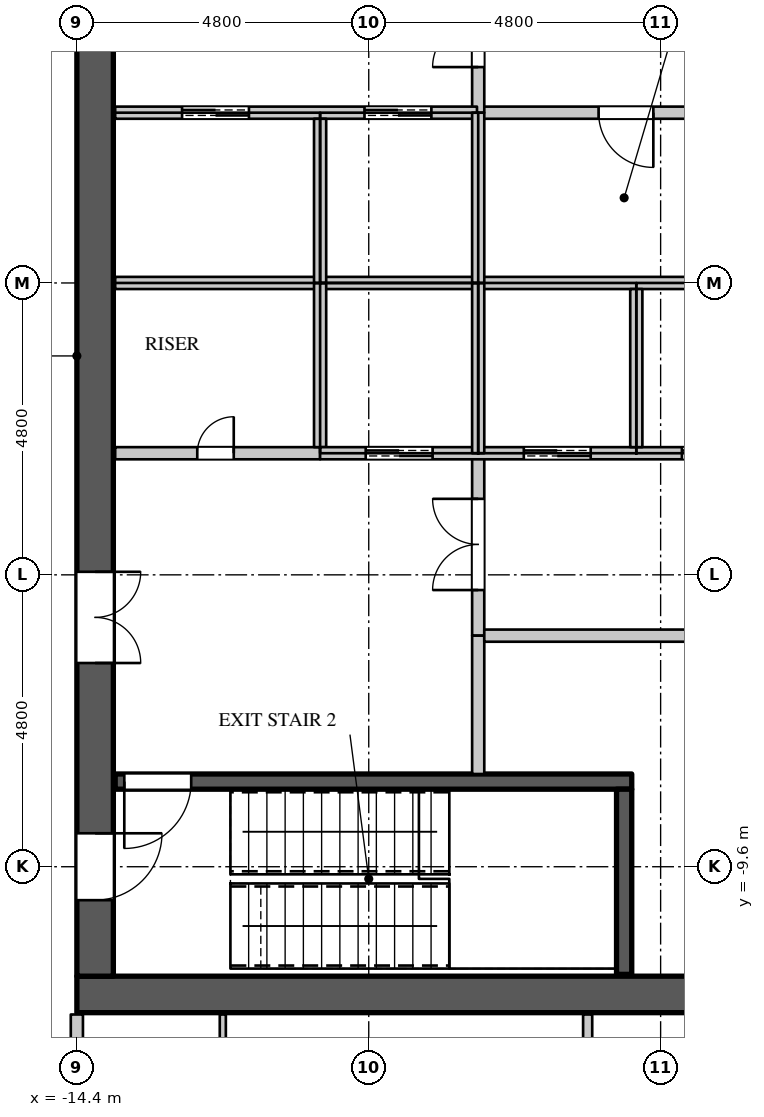
"""IFC4 building model, lengths in metres.
Left out: names, types, materials, properties, quantities, classifications, styles, units other than length and angle.
Written with IfcOpenShell. Run it as: python <this file> out.ifc"""

import sys

from ifc_helpers import new_model, si_unit, direction, frame, frame_2d, origin, place, context, subcontext, project, spatial, rectangle, extrude, element, fill, save


model = new_model("IFC4")
c1 = context("Model", 3, precision=1e-05, world=origin(), true_north=direction((0.0, 1.0)))
c2 = subcontext(c1, "Body", "Model", "MODEL_VIEW")
j1 = project(units=[si_unit("LENGTHUNIT", "METRE"), si_unit("PLANEANGLEUNIT", "RADIAN")], contexts=[c1])
p1 = place(None, origin())
s1 = spatial("IfcSite", under=j1, at=p1, CompositionType="ELEMENT")
p2 = place(p1, origin())
s2 = spatial("IfcBuilding", under=s1, at=p2, CompositionType="ELEMENT")
p3 = place(p2, frame((0.0, 0.0, 272.7)))
s3 = spatial("IfcBuildingStorey", under=s2, at=p3, CompositionType="ELEMENT", Elevation=272.7)
p4 = place(p3, frame((-14.4, -11.7, 0.0), z_axis=(0.0, 0.0, 1.0), x_axis=(1.0, 0.0, 0.0)))
e1 = element("IfcWall", 1, at=p4, inside=s3, PredefinedType="SHEAR", context=c2, shape_type="SweptSolid", body=[
    extrude(rectangle(XDim=28.8, YDim=0.6, at=frame_2d((14.4, 0.0))), origin(), (0.0, 0.0, 1.0), 4.2),
])
p5 = place(p3, frame((-14.1, -11.4, 0.0), z_axis=(0.0, 0.0, 1.0), x_axis=(0.0, 1.0, 0.0)))
e2 = element("IfcWall", 2, at=p5, inside=s3, PredefinedType="SHEAR", context=c2, shape_type="SweptSolid", body=[
    extrude(rectangle(XDim=22.8, YDim=0.6, at=frame_2d((11.4, 0.0))), origin(), (0.0, 0.0, 1.0), 4.2),
])
p6 = place(p5, frame((20.45, 0.0, 0.0)))
e3 = element("IfcOpeningElement", 3, at=p6, cuts=e2, PredefinedType="OPENING", context=c2, shape_type="SweptSolid", body=[
    extrude(rectangle(XDim=1.1, YDim=2.2, at=frame_2d((0.55, 1.1))), frame((0.0, 0.31, 0.0), z_axis=(0.0, -1.0, 0.0), x_axis=(1.0, 0.0, 0.0)), (0.0, 0.0, 1.0), 0.62),
])
p7 = place(p5, frame((1.25, 0.0, 0.0)))
e4 = element("IfcOpeningElement", 4, at=p7, cuts=e2, PredefinedType="OPENING", context=c2, shape_type="SweptSolid", body=[
    extrude(rectangle(XDim=1.1, YDim=2.2, at=frame_2d((0.55, 1.1))), frame((0.0, 0.31, 0.0), z_axis=(0.0, -1.0, 0.0), x_axis=(1.0, 0.0, 0.0)), (0.0, 0.0, 1.0), 0.62),
])
p8 = place(p5, frame((16.15, 0.0, 0.0)))
e5 = element("IfcOpeningElement", 5, at=p8, cuts=e2, PredefinedType="OPENING", context=c2, shape_type="SweptSolid", body=[
    extrude(rectangle(XDim=1.5, YDim=2.4, at=frame_2d((0.75, 1.2))), frame((0.0, 0.31, 0.0), z_axis=(0.0, -1.0, 0.0), x_axis=(1.0, 0.0, 0.0)), (0.0, 0.0, 1.0), 0.62),
])
p9 = place(p5, frame((5.15, 0.0, 0.0)))
e6 = element("IfcOpeningElement", 6, at=p9, cuts=e2, PredefinedType="OPENING", context=c2, shape_type="SweptSolid", body=[
    extrude(rectangle(XDim=1.5, YDim=2.4, at=frame_2d((0.75, 1.2))), frame((0.0, 0.31, 0.0), z_axis=(0.0, -1.0, 0.0), x_axis=(1.0, 0.0, 0.0)), (0.0, 0.0, 1.0), 0.62),
])
p10 = place(p3, frame((-14.4, -14.3, 0.0), z_axis=(0.0, 0.0, 1.0), x_axis=(0.0, 1.0, 0.0)))
e7 = element("IfcWall", 7, at=p10, inside=s3, PredefinedType="PARTITIONING", context=c2, shape_type="SweptSolid", body=[
    extrude(rectangle(XDim=2.27, YDim=0.2, at=frame_2d((1.135, 0.0))), origin(), (0.0, 0.0, 1.0), 3.95),
])
p11 = place(p3, frame((-7.82, 2.8, 0.0), z_axis=(0.0, 0.0, 1.0), x_axis=(1.0, 0.0, 0.0)))
e8 = element("IfcWall", 8, at=p11, inside=s3, PredefinedType="PARTITIONING", context=c2, shape_type="SweptSolid", body=[
    extrude(rectangle(XDim=18.24, YDim=0.2, at=frame_2d((9.12, 0.0))), origin(), (0.0, 0.0, 1.0), 3.95),
])
p12 = place(p11, frame((2.0, 0.0, 0.0)))
e9 = element("IfcOpeningElement", 9, at=p12, cuts=e8, PredefinedType="OPENING", context=c2, shape_type="SweptSolid", body=[
    extrude(rectangle(XDim=0.9, YDim=2.2, at=frame_2d((0.45, 1.1))), frame((0.0, 0.11, 0.0), z_axis=(0.0, -1.0, 0.0), x_axis=(1.0, 0.0, 0.0)), (0.0, 0.0, 1.0), 0.22),
])
p13 = place(p11, frame((6.25, 0.0, 0.0)))
e10 = element("IfcOpeningElement", 10, at=p13, cuts=e8, PredefinedType="OPENING", context=c2, shape_type="SweptSolid", body=[
    extrude(rectangle(XDim=0.9, YDim=2.2, at=frame_2d((0.45, 1.1))), frame((0.0, 0.11, 0.0), z_axis=(0.0, -1.0, 0.0), x_axis=(1.0, 0.0, 0.0)), (0.0, 0.0, 1.0), 0.22),
])
p14 = place(p11, frame((9.65, 0.0, 0.0)))
e11 = element("IfcOpeningElement", 11, at=p14, cuts=e8, PredefinedType="OPENING", context=c2, shape_type="SweptSolid", body=[
    extrude(rectangle(XDim=0.9, YDim=2.2, at=frame_2d((0.45, 1.1))), frame((0.0, 0.11, 0.0), z_axis=(0.0, -1.0, 0.0), x_axis=(1.0, 0.0, 0.0)), (0.0, 0.0, 1.0), 0.22),
])
p15 = place(p11, frame((12.35, 0.0, 0.0)))
e12 = element("IfcOpeningElement", 12, at=p15, cuts=e8, PredefinedType="OPENING", context=c2, shape_type="SweptSolid", body=[
    extrude(rectangle(XDim=0.9, YDim=2.2, at=frame_2d((0.45, 1.1))), frame((0.0, 0.11, 0.0), z_axis=(0.0, -1.0, 0.0), x_axis=(1.0, 0.0, 0.0)), (0.0, 0.0, 1.0), 0.22),
])
p16 = place(p11, frame((15.6, 0.0, 0.0)))
e13 = element("IfcOpeningElement", 13, at=p16, cuts=e8, PredefinedType="OPENING", context=c2, shape_type="SweptSolid", body=[
    extrude(rectangle(XDim=0.9, YDim=2.2, at=frame_2d((0.45, 1.1))), frame((0.0, 0.11, 0.0), z_axis=(0.0, -1.0, 0.0), x_axis=(1.0, 0.0, 0.0)), (0.0, 0.0, 1.0), 0.22),
])
p17 = place(p3, frame((-7.8, -5.8, 0.0), z_axis=(0.0, 0.0, 1.0), x_axis=(0.0, 1.0, 0.0)))
e14 = element("IfcWall", 14, at=p17, inside=s3, PredefinedType="PARTITIONING", context=c2, shape_type="SweptSolid", body=[
    extrude(rectangle(XDim=3.0, YDim=0.2, at=frame_2d((1.5, 0.0))), origin(), (0.0, 0.0, 1.0), 3.95),
])
p18 = place(p17, frame((0.75, 0.0, 0.0)))
e15 = element("IfcOpeningElement", 15, at=p18, cuts=e14, PredefinedType="OPENING", context=c2, shape_type="SweptSolid", body=[
    extrude(rectangle(XDim=1.5, YDim=2.4, at=frame_2d((0.75, 1.2))), frame((0.0, 0.11, 0.0), z_axis=(0.0, -1.0, 0.0), x_axis=(1.0, 0.0, 0.0)), (0.0, 0.0, 1.0), 0.22),
])
p19 = place(p3, frame((-7.8, 2.8, 0.0), z_axis=(0.0, 0.0, 1.0), x_axis=(0.0, 1.0, 0.0)))
e16 = element("IfcWall", 16, at=p19, inside=s3, PredefinedType="PARTITIONING", context=c2, shape_type="SweptSolid", body=[
    extrude(rectangle(XDim=3.0, YDim=0.2, at=frame_2d((1.5, 0.0))), origin(), (0.0, 0.0, 1.0), 3.95),
])
p20 = place(p19, frame((0.75, 0.0, 0.0)))
e17 = element("IfcOpeningElement", 17, at=p20, cuts=e16, PredefinedType="OPENING", context=c2, shape_type="SweptSolid", body=[
    extrude(rectangle(XDim=1.5, YDim=2.4, at=frame_2d((0.75, 1.2))), frame((0.0, 0.11, 0.0), z_axis=(0.0, -1.0, 0.0), x_axis=(1.0, 0.0, 0.0)), (0.0, 0.0, 1.0), 0.22),
])
p21 = place(p3, frame((-6.0, -17.925, 0.0), z_axis=(0.0, 0.0, 1.0), x_axis=(0.0, 1.0, 0.0)))
e18 = element("IfcWall", 18, at=p21, inside=s3, PredefinedType="PARTITIONING", context=c2, shape_type="SweptSolid", body=[
    extrude(rectangle(XDim=5.895, YDim=0.15, at=frame_2d((2.948, 0.0))), origin(), (0.0, 0.0, 1.0), 3.95),
])
p22 = place(p21, frame((2.5, 0.0, 0.0)))
e19 = element("IfcOpeningElement", 19, at=p22, cuts=e18, PredefinedType="OPENING", context=c2, shape_type="SweptSolid", body=[
    extrude(rectangle(XDim=0.9, YDim=2.2, at=frame_2d((0.45, 1.1))), frame((0.0, 0.085, 0.0), z_axis=(0.0, -1.0, 0.0), x_axis=(1.0, 0.0, 0.0)), (0.0, 0.0, 1.0), 0.17),
])
p23 = place(p3, frame((-13.77, -2.8, 0.0), z_axis=(0.0, 0.0, 1.0), x_axis=(1.0, 0.0, 0.0)))
e20 = element("IfcWall", 20, at=p23, inside=s3, PredefinedType="PARTITIONING", context=c2, shape_type="SweptSolid", body=[
    extrude(rectangle(XDim=3.37, YDim=0.2, at=frame_2d((1.685, 0.0))), origin(), (0.0, 0.0, 1.0), 3.95),
])
p24 = place(p23, frame((1.35, 0.0, 0.0)))
e21 = element("IfcOpeningElement", 21, at=p24, cuts=e20, PredefinedType="OPENING", context=c2, shape_type="SweptSolid", body=[
    extrude(rectangle(XDim=0.6, YDim=2.0, at=frame_2d((0.3, 1.0))), frame((0.0, 0.11, 0.0), z_axis=(0.0, -1.0, 0.0), x_axis=(1.0, 0.0, 0.0)), (0.0, 0.0, 1.0), 0.22),
])
p25 = place(p3, frame((-7.8, -8.075, 0.0), z_axis=(0.0, 0.0, 1.0), x_axis=(0.0, 1.0, 0.0)))
e22 = element("IfcWall", 22, at=p25, inside=s3, PredefinedType="PARTITIONING", context=c2, shape_type="SweptSolid", body=[
    extrude(rectangle(XDim=2.275, YDim=0.2, at=frame_2d((1.137, 0.0))), origin(), (0.0, 0.0, 1.0), 3.95),
])
p26 = place(p3, frame((-7.7, -5.8, 0.0), z_axis=(0.0, 0.0, 1.0), x_axis=(1.0, 0.0, 0.0)))
e23 = element("IfcWall", 23, at=p26, inside=s3, PredefinedType="PARTITIONING", context=c2, shape_type="SweptSolid", body=[
    extrude(rectangle(XDim=11.72, YDim=0.2, at=frame_2d((5.86, 0.0))), origin(), (0.0, 0.0, 1.0), 3.95),
])
p27 = place(p26, frame((5.4, 0.0, 0.0)))
e24 = element("IfcOpeningElement", 24, at=p27, cuts=e23, PredefinedType="OPENING", context=c2, shape_type="SweptSolid", body=[
    extrude(rectangle(XDim=0.9, YDim=2.2, at=frame_2d((0.45, 1.1))), frame((0.0, 0.11, 0.0), z_axis=(0.0, -1.0, 0.0), x_axis=(1.0, 0.0, 0.0)), (0.0, 0.0, 1.0), 0.22),
])
p28 = place(p3, frame((-13.77, 0.0, 0.0), z_axis=(0.0, 0.0, 1.0), x_axis=(1.0, 0.0, 0.0)))
e25 = element("IfcWall", 25, at=p28, inside=s3, PredefinedType="PARTITIONING", context=c2, shape_type="SweptSolid", body=[
    extrude(rectangle(XDim=21.57, YDim=0.2, at=frame_2d((10.785, 0.0))), origin(), (0.0, 0.0, 1.0), 3.95),
])
p29 = place(p3, frame((-13.77, 2.8, 0.0), z_axis=(0.0, 0.0, 1.0), x_axis=(1.0, 0.0, 0.0)))
e26 = element("IfcWall", 26, at=p29, inside=s3, PredefinedType="PARTITIONING", context=c2, shape_type="SweptSolid", body=[
    extrude(rectangle(XDim=5.95, YDim=0.2, at=frame_2d((2.975, 0.0))), origin(), (0.0, 0.0, 1.0), 3.95),
])
p30 = place(p29, frame((1.1, 0.0, 0.0)))
e27 = element("IfcOpeningElement", 27, at=p30, cuts=e26, PredefinedType="OPENING", context=c2, shape_type="SweptSolid", body=[
    extrude(rectangle(XDim=1.1, YDim=2.2, at=frame_2d((0.55, 1.1))), frame((0.0, 0.11, 0.0), z_axis=(0.0, -1.0, 0.0), x_axis=(1.0, 0.0, 0.0)), (0.0, 0.0, 1.0), 0.22),
])
p31 = place(p29, frame((4.1, 0.0, 0.0)))
e28 = element("IfcOpeningElement", 28, at=p31, cuts=e26, PredefinedType="OPENING", context=c2, shape_type="SweptSolid", body=[
    extrude(rectangle(XDim=1.1, YDim=2.2, at=frame_2d((0.55, 1.1))), frame((0.0, 0.11, 0.0), z_axis=(0.0, -1.0, 0.0), x_axis=(1.0, 0.0, 0.0)), (0.0, 0.0, 1.0), 0.22),
])
p32 = place(p3, frame((-10.4, -2.7, 0.0), z_axis=(0.0, 0.0, 1.0), x_axis=(0.0, 1.0, 0.0)))
e29 = element("IfcWall", 29, at=p32, inside=s3, PredefinedType="PARTITIONING", context=c2, shape_type="SweptSolid", body=[
    extrude(rectangle(XDim=2.7, YDim=0.2, at=frame_2d((1.35, 0.0))), origin(), (0.0, 0.0, 1.0), 3.95),
])
p33 = place(p3, frame((-10.4, -2.8, 0.0), z_axis=(0.0, 0.0, 1.0), x_axis=(1.0, 0.0, 0.0)))
e30 = element("IfcWall", 30, at=p33, inside=s3, PredefinedType="PARTITIONING", context=c2, shape_type="SweptSolid", body=[
    extrude(rectangle(XDim=18.2, YDim=0.2, at=frame_2d((9.1, 0.0))), origin(), (0.0, 0.0, 1.0), 3.95),
])
p34 = place(p33, frame((0.75, 0.0, 0.0)))
e31 = element("IfcOpeningElement", 31, at=p34, cuts=e30, PredefinedType="OPENING", context=c2, shape_type="SweptSolid", body=[
    extrude(rectangle(XDim=1.1, YDim=2.2, at=frame_2d((0.55, 1.1))), frame((0.0, 0.11, 0.0), z_axis=(0.0, -1.0, 0.0), x_axis=(1.0, 0.0, 0.0)), (0.0, 0.0, 1.0), 0.22),
])
p35 = place(p33, frame((3.35, 0.0, 0.0)))
e32 = element("IfcOpeningElement", 32, at=p35, cuts=e30, PredefinedType="OPENING", context=c2, shape_type="SweptSolid", body=[
    extrude(rectangle(XDim=1.1, YDim=2.2, at=frame_2d((0.55, 1.1))), frame((0.0, 0.11, 0.0), z_axis=(0.0, -1.0, 0.0), x_axis=(1.0, 0.0, 0.0)), (0.0, 0.0, 1.0), 0.22),
])
p36 = place(p33, frame((5.95, 0.0, 0.0)))
e33 = element("IfcOpeningElement", 33, at=p36, cuts=e30, PredefinedType="OPENING", context=c2, shape_type="SweptSolid", body=[
    extrude(rectangle(XDim=1.1, YDim=2.2, at=frame_2d((0.55, 1.1))), frame((0.0, 0.11, 0.0), z_axis=(0.0, -1.0, 0.0), x_axis=(1.0, 0.0, 0.0)), (0.0, 0.0, 1.0), 0.22),
])
p37 = place(p33, frame((8.55, 0.0, 0.0)))
e34 = element("IfcOpeningElement", 34, at=p37, cuts=e30, PredefinedType="OPENING", context=c2, shape_type="SweptSolid", body=[
    extrude(rectangle(XDim=1.1, YDim=2.2, at=frame_2d((0.55, 1.1))), frame((0.0, 0.11, 0.0), z_axis=(0.0, -1.0, 0.0), x_axis=(1.0, 0.0, 0.0)), (0.0, 0.0, 1.0), 0.22),
])
p38 = place(p33, frame((11.15, 0.0, 0.0)))
e35 = element("IfcOpeningElement", 35, at=p38, cuts=e30, PredefinedType="OPENING", context=c2, shape_type="SweptSolid", body=[
    extrude(rectangle(XDim=1.1, YDim=2.2, at=frame_2d((0.55, 1.1))), frame((0.0, 0.11, 0.0), z_axis=(0.0, -1.0, 0.0), x_axis=(1.0, 0.0, 0.0)), (0.0, 0.0, 1.0), 0.22),
])
p39 = place(p33, frame((13.75, 0.0, 0.0)))
e36 = element("IfcOpeningElement", 36, at=p39, cuts=e30, PredefinedType="OPENING", context=c2, shape_type="SweptSolid", body=[
    extrude(rectangle(XDim=1.1, YDim=2.2, at=frame_2d((0.55, 1.1))), frame((0.0, 0.11, 0.0), z_axis=(0.0, -1.0, 0.0), x_axis=(1.0, 0.0, 0.0)), (0.0, 0.0, 1.0), 0.22),
])
p40 = place(p33, frame((16.35, 0.0, 0.0)))
e37 = element("IfcOpeningElement", 37, at=p40, cuts=e30, PredefinedType="OPENING", context=c2, shape_type="SweptSolid", body=[
    extrude(rectangle(XDim=1.1, YDim=2.2, at=frame_2d((0.55, 1.1))), frame((0.0, 0.11, 0.0), z_axis=(0.0, -1.0, 0.0), x_axis=(1.0, 0.0, 0.0)), (0.0, 0.0, 1.0), 0.22),
])
p41 = place(p3, frame((-10.4, 0.0, 0.0), z_axis=(0.0, 0.0, 1.0), x_axis=(0.0, 1.0, 0.0)))
e38 = element("IfcWall", 38, at=p41, inside=s3, PredefinedType="PARTITIONING", context=c2, shape_type="SweptSolid", body=[
    extrude(rectangle(XDim=2.7, YDim=0.2, at=frame_2d((1.35, 0.0))), origin(), (0.0, 0.0, 1.0), 3.95),
])
for number, where, z_axis, x_axis in (
    (39, (-7.8, -2.8, 0.0), (0.0, 0.0, 1.0), (0.0, 1.0, 0.0)),
    (40, (-7.8, 0.0, 0.0), (0.0, 0.0, 1.0), (0.0, 1.0, 0.0)),
):
    element("IfcWall", number, at=place(p3, frame(where, z_axis=z_axis, x_axis=x_axis)), inside=s3, PredefinedType="PARTITIONING", context=c2, shape_type="SweptSolid", body=[
        extrude(rectangle(XDim=2.8, YDim=0.2, at=frame_2d((1.4, 0.0))), origin(), (0.0, 0.0, 1.0), 3.95),
    ])
p42 = place(p3, frame((-5.2, -2.7, 0.0), z_axis=(0.0, 0.0, 1.0), x_axis=(0.0, 1.0, 0.0)))
e41 = element("IfcWall", 41, at=p42, inside=s3, PredefinedType="PARTITIONING", context=c2, shape_type="SweptSolid", body=[
    extrude(rectangle(XDim=2.6, YDim=0.2, at=frame_2d((1.3, 0.0))), origin(), (0.0, 0.0, 1.0), 3.95),
])
p43 = place(p3, frame((-13.77, -8.2, 0.0), z_axis=(0.0, 0.0, 1.0), x_axis=(1.0, 0.0, 0.0)))
e42 = element("IfcWall", 42, at=p43, inside=s3, PredefinedType="SHEAR", context=c2, shape_type="SweptSolid", body=[
    extrude(rectangle(XDim=8.495, YDim=0.25, at=frame_2d((4.248, 0.0))), origin(), (0.0, 0.0, 1.0), 3.95),
])
p44 = place(p43, frame((0.15, 0.0, 0.0)))
e43 = element("IfcOpeningElement", 43, at=p44, cuts=e42, PredefinedType="OPENING", context=c2, shape_type="SweptSolid", body=[
    extrude(rectangle(XDim=1.1, YDim=2.2, at=frame_2d((0.55, 1.1))), frame((0.0, 0.135, 0.0), z_axis=(0.0, -1.0, 0.0), x_axis=(1.0, 0.0, 0.0)), (0.0, 0.0, 1.0), 0.27),
])
p45 = place(p3, frame((-5.4, -11.37, 0.0), z_axis=(0.0, 0.0, 1.0), x_axis=(0.0, 1.0, 0.0)))
e44 = element("IfcWall", 44, at=p45, inside=s3, PredefinedType="SHEAR", context=c2, shape_type="SweptSolid", body=[
    extrude(rectangle(XDim=3.045, YDim=0.25, at=frame_2d((1.522, 0.0))), origin(), (0.0, 0.0, 1.0), 3.95),
])
p46 = place(p3, frame((-12.0, -16.975, 0.0), z_axis=(0.0, 0.0, 1.0), x_axis=(0.0, 1.0, 0.0)))
e45 = element("IfcWall", 45, at=p46, inside=s3, PredefinedType="PARTITIONING", context=c2, shape_type="SweptSolid", body=[
    extrude(rectangle(XDim=4.945, YDim=0.1, at=frame_2d((2.473, 0.0))), origin(), (0.0, 0.0, 1.0), 3.95),
])
p47 = place(p46, frame((2.0, 0.0, 0.0)))
e46 = element("IfcOpeningElement", 46, at=p47, cuts=e45, PredefinedType="OPENING", context=c2, shape_type="SweptSolid", body=[
    extrude(rectangle(XDim=0.9, YDim=2.2, at=frame_2d((0.45, 1.1))), frame((0.0, 0.06, 0.0), z_axis=(0.0, -1.0, 0.0), x_axis=(1.0, 0.0, 0.0)), (0.0, 0.0, 1.0), 0.12),
])
p48 = place(p24, origin())
e47 = element("IfcDoor", 47, at=p48, inside=s3, OperationType="SINGLE_SWING_RIGHT", PredefinedType="DOOR", context=c2, shape_type="SweptSolid", body=[
    extrude(rectangle(XDim=0.6, YDim=2.0, at=frame_2d((0.3, 1.0))), frame((0.0, 0.025, 0.0), z_axis=(0.0, -1.0, 0.0), x_axis=(1.0, 0.0, 0.0)), (0.0, 0.0, 1.0), 0.05),
])
fill(e21, e47)
p49 = place(p12, origin())
e48 = element("IfcDoor", 48, at=p49, inside=s3, OperationType="SINGLE_SWING_LEFT", PredefinedType="DOOR", context=c2, shape_type="SweptSolid", body=[
    extrude(rectangle(XDim=0.9, YDim=2.2, at=frame_2d((0.45, 1.1))), frame((0.0, 0.025, 0.0), z_axis=(0.0, -1.0, 0.0), x_axis=(1.0, 0.0, 0.0)), (0.0, 0.0, 1.0), 0.05),
])
fill(e9, e48)
p50 = place(p30, origin())
e49 = element("IfcDoor", 49, at=p50, inside=s3, OperationType="DOUBLE_DOOR_SLIDING", PredefinedType="DOOR", context=c2, shape_type="SweptSolid", body=[
    extrude(rectangle(XDim=1.1, YDim=2.2, at=frame_2d((0.55, 1.1))), frame((0.0, 0.025, 0.0), z_axis=(0.0, -1.0, 0.0), x_axis=(1.0, 0.0, 0.0)), (0.0, 0.0, 1.0), 0.05),
])
fill(e27, e49)
p51 = place(p31, origin())
e50 = element("IfcDoor", 50, at=p51, inside=s3, OperationType="DOUBLE_DOOR_SLIDING", PredefinedType="DOOR", context=c2, shape_type="SweptSolid", body=[
    extrude(rectangle(XDim=1.1, YDim=2.2, at=frame_2d((0.55, 1.1))), frame((0.0, 0.025, 0.0), z_axis=(0.0, -1.0, 0.0), x_axis=(1.0, 0.0, 0.0)), (0.0, 0.0, 1.0), 0.05),
])
fill(e28, e50)
p52 = place(p34, origin())
e51 = element("IfcDoor", 51, at=p52, inside=s3, OperationType="DOUBLE_DOOR_SLIDING", PredefinedType="DOOR", context=c2, shape_type="SweptSolid", body=[
    extrude(rectangle(XDim=1.1, YDim=2.2, at=frame_2d((0.55, 1.1))), frame((0.0, 0.025, 0.0), z_axis=(0.0, -1.0, 0.0), x_axis=(1.0, 0.0, 0.0)), (0.0, 0.0, 1.0), 0.05),
])
fill(e31, e51)
p53 = place(p35, origin())
e52 = element("IfcDoor", 52, at=p53, inside=s3, OperationType="DOUBLE_DOOR_SLIDING", PredefinedType="DOOR", context=c2, shape_type="SweptSolid", body=[
    extrude(rectangle(XDim=1.1, YDim=2.2, at=frame_2d((0.55, 1.1))), frame((0.0, 0.025, 0.0), z_axis=(0.0, -1.0, 0.0), x_axis=(1.0, 0.0, 0.0)), (0.0, 0.0, 1.0), 0.05),
])
fill(e32, e52)
p54 = place(p36, origin())
e53 = element("IfcDoor", 53, at=p54, inside=s3, OperationType="DOUBLE_DOOR_SLIDING", PredefinedType="DOOR", context=c2, shape_type="SweptSolid", body=[
    extrude(rectangle(XDim=1.1, YDim=2.2, at=frame_2d((0.55, 1.1))), frame((0.0, 0.025, 0.0), z_axis=(0.0, -1.0, 0.0), x_axis=(1.0, 0.0, 0.0)), (0.0, 0.0, 1.0), 0.05),
])
fill(e33, e53)
p55 = place(p44, origin())
e54 = element("IfcDoor", 54, at=p55, inside=s3, OperationType="SINGLE_SWING_RIGHT", PredefinedType="DOOR", context=c2, shape_type="SweptSolid", body=[
    extrude(rectangle(XDim=1.1, YDim=2.2, at=frame_2d((0.55, 1.1))), frame((0.0, 0.025, 0.0), z_axis=(0.0, -1.0, 0.0), x_axis=(1.0, 0.0, 0.0)), (0.0, 0.0, 1.0), 0.05),
])
fill(e43, e54)
p56 = place(p20, origin())
e55 = element("IfcDoor", 55, at=p56, inside=s3, OperationType="DOUBLE_DOOR_SINGLE_SWING", PredefinedType="DOOR", context=c2, shape_type="SweptSolid", body=[
    extrude(rectangle(XDim=1.5, YDim=2.4, at=frame_2d((0.75, 1.2))), frame((0.0, 0.025, 0.0), z_axis=(0.0, -1.0, 0.0), x_axis=(1.0, 0.0, 0.0)), (0.0, 0.0, 1.0), 0.05),
])
fill(e17, e55)
p57 = place(p18, origin())
e56 = element("IfcDoor", 56, at=p57, inside=s3, OperationType="DOUBLE_DOOR_SINGLE_SWING", PredefinedType="DOOR", context=c2, shape_type="SweptSolid", body=[
    extrude(rectangle(XDim=1.5, YDim=2.4, at=frame_2d((0.75, 1.2))), frame((0.0, 0.025, 0.0), z_axis=(0.0, -1.0, 0.0), x_axis=(1.0, 0.0, 0.0)), (0.0, 0.0, 1.0), 0.05),
])
fill(e15, e56)
p58 = place(p7, origin())
e57 = element("IfcDoor", 57, at=p58, inside=s3, OperationType="SINGLE_SWING_LEFT", PredefinedType="DOOR", context=c2, shape_type="SweptSolid", body=[
    extrude(rectangle(XDim=1.1, YDim=2.2, at=frame_2d((0.55, 1.1))), frame((0.0, -0.245, 0.0), z_axis=(0.0, -1.0, 0.0), x_axis=(1.0, 0.0, 0.0)), (0.0, 0.0, 1.0), 0.05),
])
fill(e4, e57)
p59 = place(p9, origin())
e58 = element("IfcDoor", 58, at=p59, inside=s3, OperationType="DOUBLE_DOOR_SINGLE_SWING", PredefinedType="DOOR", context=c2, shape_type="SweptSolid", body=[
    extrude(rectangle(XDim=1.5, YDim=2.4, at=frame_2d((0.75, 1.2))), frame((0.0, -0.245, 0.0), z_axis=(0.0, -1.0, 0.0), x_axis=(1.0, 0.0, 0.0)), (0.0, 0.0, 1.0), 0.05),
])
fill(e6, e58)
save(model, sys.argv[1])
